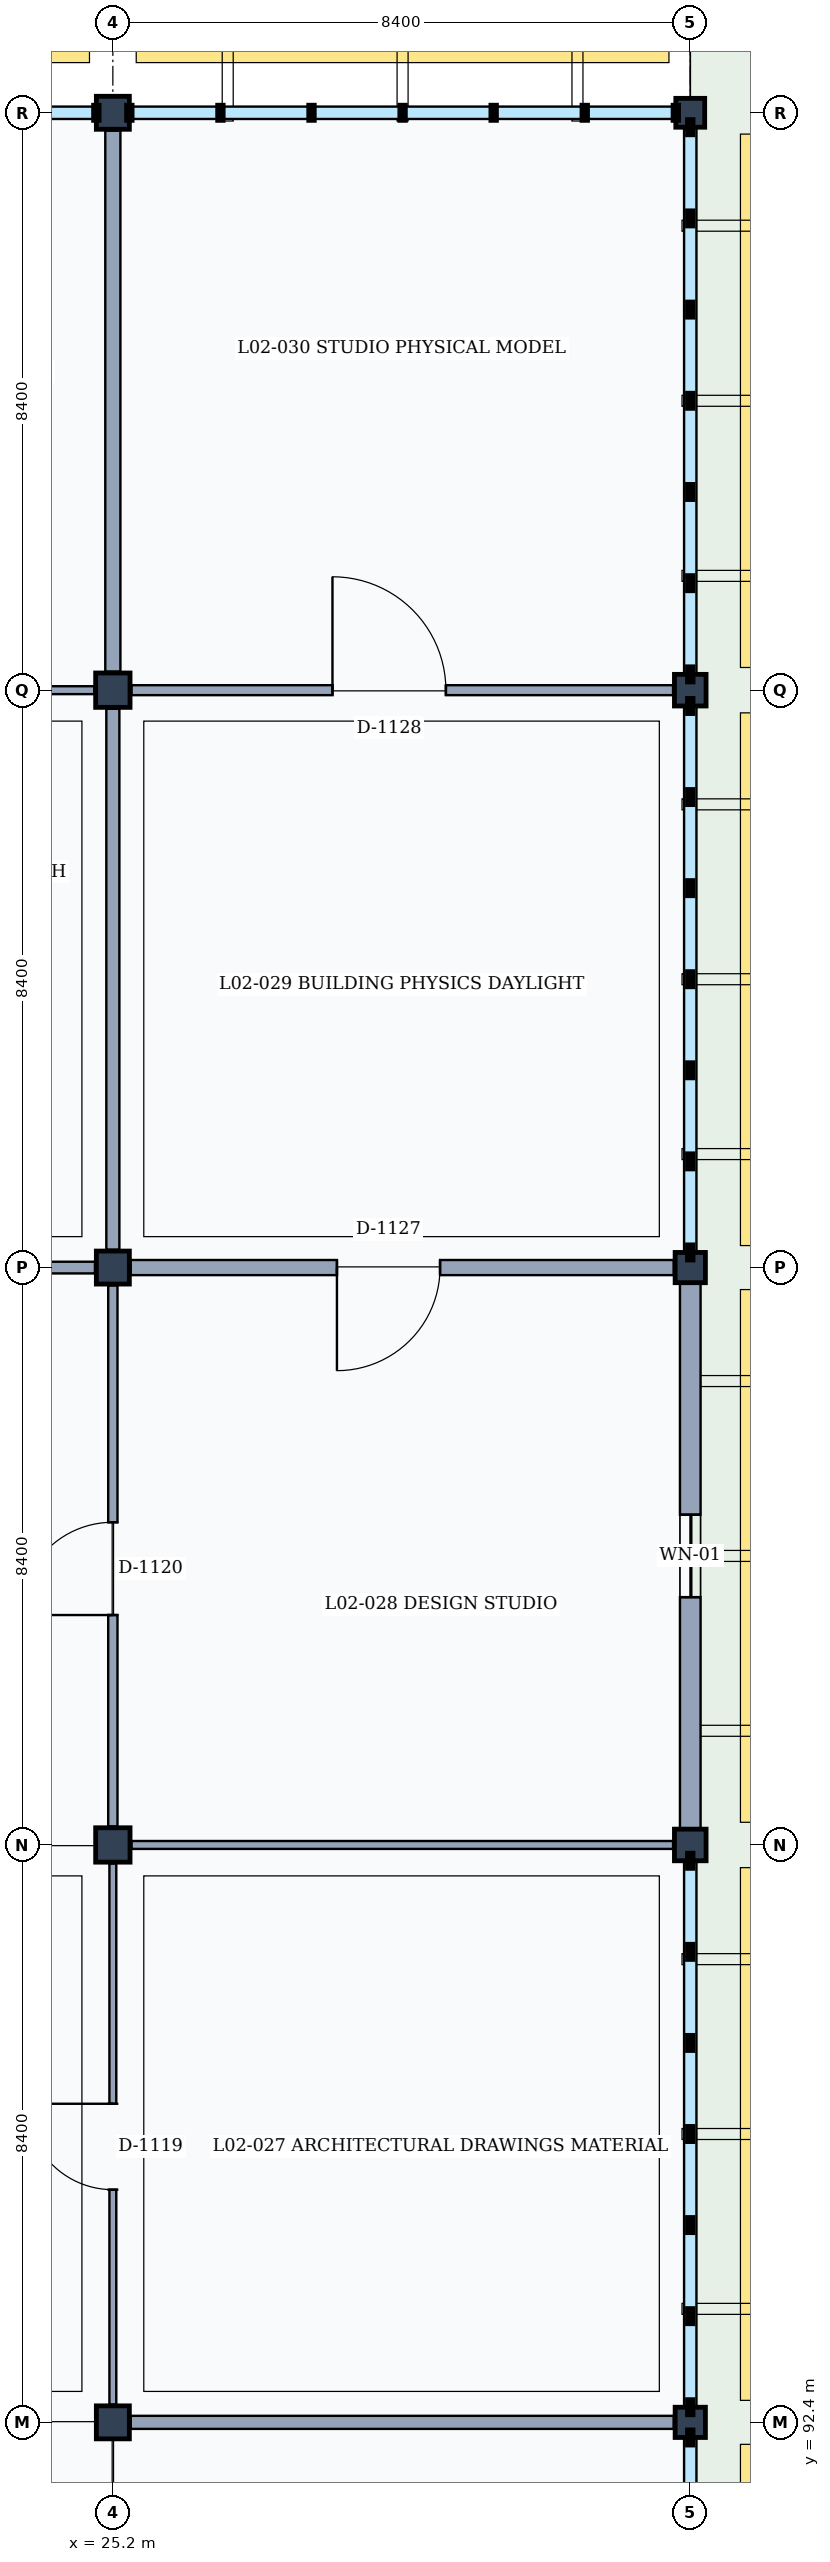
"""IFC4 building model, lengths in metres.
Left out: names, types, materials, properties, quantities, classifications, styles, units other than length and angle.
Written with IfcOpenShell. Run it as: python <this file> out.ifc"""

import sys

from ifc_helpers import new_model, si_unit, direction, frame, frame_2d, origin, origin_2d, place, context, subcontext, project, spatial, rectangle, extrude, element, fill, save


model = new_model("IFC4")
c1 = context("Model", 3, precision=1e-05, world=origin(), true_north=direction((0.0, 1.0)))
c2 = subcontext(c1, "Body", "Model", "MODEL_VIEW")
j1 = project(units=[si_unit("LENGTHUNIT", "METRE"), si_unit("PLANEANGLEUNIT", "RADIAN")], contexts=[c1])
p1 = place(None, origin())
s1 = spatial("IfcSite", under=j1, at=p1, CompositionType="ELEMENT")
p2 = place(p1, origin())
s2 = spatial("IfcBuilding", under=s1, at=p2, CompositionType="ELEMENT")
p3 = place(p2, frame((0.0, 0.0, 9.6)))
s3 = spatial("IfcBuildingStorey", under=s2, at=p3, CompositionType="ELEMENT", Elevation=9.6)
p4 = place(p3, frame((25.2, 92.4, 0.0), z_axis=(0.0, 0.0, 1.0), x_axis=(1.0, 0.0, 0.0)))
e1 = element("IfcColumn", 1, at=p4, inside=s3, PredefinedType="COLUMN", context=c2, shape_type="SweptSolid", body=[
    extrude(rectangle(XDim=0.48, YDim=0.48, at=origin_2d()), origin(), (0.0, 0.0, 1.0), 4.2),
])
p5 = place(p3, frame((25.2, 100.8, 0.0), z_axis=(0.0, 0.0, 1.0), x_axis=(1.0, 0.0, 0.0)))
e2 = element("IfcColumn", 2, at=p5, inside=s3, PredefinedType="COLUMN", context=c2, shape_type="SweptSolid", body=[
    extrude(rectangle(XDim=0.5, YDim=0.5, at=origin_2d()), origin(), (0.0, 0.0, 1.0), 4.2),
])
p6 = place(p3, frame((25.2, 109.2, 0.0), z_axis=(0.0, 0.0, 1.0), x_axis=(1.0, 0.0, 0.0)))
e3 = element("IfcColumn", 3, at=p6, inside=s3, PredefinedType="COLUMN", context=c2, shape_type="SweptSolid", body=[
    extrude(rectangle(XDim=0.48, YDim=0.48, at=origin_2d()), origin(), (0.0, 0.0, 1.0), 4.2),
])
p7 = place(p3, frame((25.2, 117.6, 0.0), z_axis=(0.0, 0.0, 1.0), x_axis=(1.0, 0.0, 0.0)))
e4 = element("IfcColumn", 4, at=p7, inside=s3, PredefinedType="COLUMN", context=c2, shape_type="SweptSolid", body=[
    extrude(rectangle(XDim=0.5, YDim=0.5, at=origin_2d()), origin(), (0.0, 0.0, 1.0), 4.2),
])
p8 = place(p3, frame((25.2, 126.0, 0.0), z_axis=(0.0, 0.0, 1.0), x_axis=(1.0, 0.0, 0.0)))
e5 = element("IfcColumn", 5, at=p8, inside=s3, PredefinedType="COLUMN", context=c2, shape_type="SweptSolid", body=[
    extrude(rectangle(XDim=0.48, YDim=0.48, at=origin_2d()), origin(), (0.0, 0.0, 1.0), 4.2),
])
p9 = place(p3, frame((33.6, 92.4, 0.0), z_axis=(0.0, 0.0, 1.0), x_axis=(1.0, 0.0, 0.0)))
e6 = element("IfcColumn", 6, at=p9, inside=s3, PredefinedType="COLUMN", context=c2, shape_type="SweptSolid", body=[
    extrude(rectangle(XDim=0.44, YDim=0.44, at=origin_2d()), origin(), (0.0, 0.0, 1.0), 4.2),
])
p10 = place(p3, frame((33.6, 100.8, 0.0), z_axis=(0.0, 0.0, 1.0), x_axis=(1.0, 0.0, 0.0)))
e7 = element("IfcColumn", 7, at=p10, inside=s3, PredefinedType="COLUMN", context=c2, shape_type="SweptSolid", body=[
    extrude(rectangle(XDim=0.46, YDim=0.46, at=origin_2d()), origin(), (0.0, 0.0, 1.0), 4.2),
])
p11 = place(p3, frame((33.6, 109.2, 0.0), z_axis=(0.0, 0.0, 1.0), x_axis=(1.0, 0.0, 0.0)))
e8 = element("IfcColumn", 8, at=p11, inside=s3, PredefinedType="COLUMN", context=c2, shape_type="SweptSolid", body=[
    extrude(rectangle(XDim=0.44, YDim=0.44, at=origin_2d()), origin(), (0.0, 0.0, 1.0), 4.2),
])
p12 = place(p3, frame((33.6, 117.6, 0.0), z_axis=(0.0, 0.0, 1.0), x_axis=(1.0, 0.0, 0.0)))
e9 = element("IfcColumn", 9, at=p12, inside=s3, PredefinedType="COLUMN", context=c2, shape_type="SweptSolid", body=[
    extrude(rectangle(XDim=0.46, YDim=0.46, at=origin_2d()), origin(), (0.0, 0.0, 1.0), 4.2),
])
p13 = place(p3, frame((33.6, 126.0, 0.0), z_axis=(0.0, 0.0, 1.0), x_axis=(1.0, 0.0, 0.0)))
e10 = element("IfcColumn", 10, at=p13, inside=s3, PredefinedType="COLUMN", context=c2, shape_type="SweptSolid", body=[
    extrude(rectangle(XDim=0.42, YDim=0.42, at=origin_2d()), origin(), (0.0, 0.0, 1.0), 4.2),
])
p14 = place(p3, frame((33.6, 108.98, 0.0), z_axis=(0.0, 0.0, 1.0), x_axis=(0.0, -1.0, 0.0)))
e11 = element("IfcWall", 11, at=p14, inside=s3, PredefinedType="SOLIDWALL", context=c2, shape_type="SweptSolid", body=[
    extrude(rectangle(XDim=7.95, YDim=0.3, at=frame_2d((3.975, 0.0))), origin(), (0.0, 0.0, 1.0), 3.36),
])
p15 = place(p14, frame((3.375, 0.0, 0.9)))
e12 = element("IfcOpeningElement", 12, at=p15, cuts=e11, PredefinedType="OPENING", context=c2, shape_type="SweptSolid", body=[
    extrude(rectangle(XDim=1.2, YDim=1.8, at=frame_2d((0.6, 0.9))), frame((0.0, 0.16, 0.0), z_axis=(0.0, -1.0, 0.0), x_axis=(1.0, 0.0, 0.0)), (0.0, 0.0, 1.0), 0.32),
])
p16 = place(p3, frame((25.2, 92.66, 0.0), z_axis=(0.0, 0.0, 1.0), x_axis=(0.0, 1.0, 0.0)))
e13 = element("IfcWall", 13, at=p16, inside=s3, PredefinedType="MOVABLE", context=c2, shape_type="SweptSolid", body=[
    extrude(rectangle(XDim=7.87, YDim=0.1, at=frame_2d((3.935, 0.0))), origin(), (0.0, 0.0, 1.0), 3.32),
])
p17 = place(p16, frame((3.125, 0.0, 0.0)))
e14 = element("IfcOpeningElement", 14, at=p17, cuts=e13, PredefinedType="OPENING", context=c2, shape_type="SweptSolid", body=[
    extrude(rectangle(XDim=1.25, YDim=2.3, at=frame_2d((0.625, 1.15))), frame((0.0, 0.06, 0.0), z_axis=(0.0, -1.0, 0.0), x_axis=(1.0, 0.0, 0.0)), (0.0, 0.0, 1.0), 0.12),
])
p18 = place(p3, frame((25.2, 101.07, 0.0), z_axis=(0.0, 0.0, 1.0), x_axis=(0.0, 1.0, 0.0)))
e15 = element("IfcWall", 15, at=p18, inside=s3, PredefinedType="PARTITIONING", context=c2, shape_type="SweptSolid", body=[
    extrude(rectangle(XDim=7.87, YDim=0.135, at=frame_2d((3.935, 0.0))), origin(), (0.0, 0.0, 1.0), 3.32),
])
p19 = place(p18, frame((3.075, 0.0, 0.0)))
e16 = element("IfcOpeningElement", 16, at=p19, cuts=e15, PredefinedType="OPENING", context=c2, shape_type="SweptSolid", body=[
    extrude(rectangle(XDim=1.35, YDim=2.25, at=frame_2d((0.675, 1.125))), frame((0.0, 0.077, 0.0), z_axis=(0.0, -1.0, 0.0), x_axis=(1.0, 0.0, 0.0)), (0.0, 0.0, 1.0), 0.155),
])
p20 = place(p3, frame((17.06, 109.2, 0.0), z_axis=(0.0, 0.0, 1.0), x_axis=(1.0, 0.0, 0.0)))
e17 = element("IfcWall", 17, at=p20, inside=s3, PredefinedType="PARTITIONING", context=c2, shape_type="SweptSolid", body=[
    extrude(rectangle(XDim=7.88, YDim=0.17, at=frame_2d((3.94, 0.0))), origin(), (0.0, 0.0, 1.0), 3.32),
])
p21 = place(p20, frame((3.025, 0.0, 0.0)))
e18 = element("IfcOpeningElement", 18, at=p21, cuts=e17, PredefinedType="OPENING", context=c2, shape_type="SweptSolid", body=[
    extrude(rectangle(XDim=1.45, YDim=2.35, at=frame_2d((0.725, 1.175))), frame((0.0, 0.095, 0.0), z_axis=(0.0, -1.0, 0.0), x_axis=(1.0, 0.0, 0.0)), (0.0, 0.0, 1.0), 0.19),
])
p22 = place(p3, frame((25.2, 109.46, 0.0), z_axis=(0.0, 0.0, 1.0), x_axis=(0.0, 1.0, 0.0)))
e19 = element("IfcWall", 19, at=p22, inside=s3, PredefinedType="PARTITIONING", context=c2, shape_type="SweptSolid", body=[
    extrude(rectangle(XDim=7.87, YDim=0.19, at=frame_2d((3.935, 0.0))), origin(), (0.0, 0.0, 1.0), 3.32),
])
p23 = place(p3, frame((17.07, 117.6, 0.0), z_axis=(0.0, 0.0, 1.0), x_axis=(1.0, 0.0, 0.0)))
e20 = element("IfcWall", 20, at=p23, inside=s3, PredefinedType="PARTITIONING", context=c2, shape_type="SweptSolid", body=[
    extrude(rectangle(XDim=7.86, YDim=0.115, at=frame_2d((3.93, 0.0))), origin(), (0.0, 0.0, 1.0), 3.32),
])
p24 = place(p23, frame((3.25, 0.0, 0.0)))
e21 = element("IfcOpeningElement", 21, at=p24, cuts=e20, PredefinedType="OPENING", context=c2, shape_type="SweptSolid", body=[
    extrude(rectangle(XDim=1.0, YDim=2.15, at=frame_2d((0.5, 1.075))), frame((0.0, 0.067, 0.0), z_axis=(0.0, -1.0, 0.0), x_axis=(1.0, 0.0, 0.0)), (0.0, 0.0, 1.0), 0.135),
])
p25 = place(p3, frame((25.2, 117.87, 0.0), z_axis=(0.0, 0.0, 1.0), x_axis=(0.0, 1.0, 0.0)))
e22 = element("IfcWall", 22, at=p25, inside=s3, PredefinedType="PARTITIONING", context=c2, shape_type="SweptSolid", body=[
    extrude(rectangle(XDim=7.87, YDim=0.22, at=frame_2d((3.935, 0.0))), origin(), (0.0, 0.0, 1.0), 3.32),
])
p26 = place(p3, frame((25.46, 92.4, 0.0), z_axis=(0.0, 0.0, 1.0), x_axis=(1.0, 0.0, 0.0)))
e23 = element("IfcWall", 23, at=p26, inside=s3, PredefinedType="PARTITIONING", context=c2, shape_type="SweptSolid", body=[
    extrude(rectangle(XDim=7.9, YDim=0.19, at=frame_2d((3.95, 0.0))), origin(), (0.0, 0.0, 1.0), 3.32),
])
p27 = place(p3, frame((25.47, 100.8, 0.0), z_axis=(0.0, 0.0, 1.0), x_axis=(1.0, 0.0, 0.0)))
e24 = element("IfcWall", 24, at=p27, inside=s3, PredefinedType="PARTITIONING", context=c2, shape_type="SweptSolid", body=[
    extrude(rectangle(XDim=7.88, YDim=0.115, at=frame_2d((3.94, 0.0))), origin(), (0.0, 0.0, 1.0), 3.32),
])
p28 = place(p3, frame((25.46, 109.2, 0.0), z_axis=(0.0, 0.0, 1.0), x_axis=(1.0, 0.0, 0.0)))
e25 = element("IfcWall", 25, at=p28, inside=s3, PredefinedType="PARTITIONING", context=c2, shape_type="SweptSolid", body=[
    extrude(rectangle(XDim=7.9, YDim=0.22, at=frame_2d((3.95, 0.0))), origin(), (0.0, 0.0, 1.0), 3.32),
])
p29 = place(p28, frame((3.0, 0.0, 0.0)))
e26 = element("IfcOpeningElement", 26, at=p29, cuts=e25, PredefinedType="OPENING", context=c2, shape_type="SweptSolid", body=[
    extrude(rectangle(XDim=1.5, YDim=2.3, at=frame_2d((0.75, 1.15))), frame((0.0, 0.12, 0.0), z_axis=(0.0, -1.0, 0.0), x_axis=(1.0, 0.0, 0.0)), (0.0, 0.0, 1.0), 0.24),
])
p30 = place(p3, frame((25.47, 117.6, 0.0), z_axis=(0.0, 0.0, 1.0), x_axis=(1.0, 0.0, 0.0)))
e27 = element("IfcWall", 27, at=p30, inside=s3, PredefinedType="PARTITIONING", context=c2, shape_type="SweptSolid", body=[
    extrude(rectangle(XDim=7.88, YDim=0.145, at=frame_2d((3.94, 0.0))), origin(), (0.0, 0.0, 1.0), 3.32),
])
p31 = place(p30, frame((2.925, 0.0, 0.0)))
e28 = element("IfcOpeningElement", 28, at=p31, cuts=e27, PredefinedType="OPENING", context=c2, shape_type="SweptSolid", body=[
    extrude(rectangle(XDim=1.65, YDim=2.25, at=frame_2d((0.825, 1.125))), frame((0.0, 0.083, 0.0), z_axis=(0.0, -1.0, 0.0), x_axis=(1.0, 0.0, 0.0)), (0.0, 0.0, 1.0), 0.165),
])
p32 = place(p15, origin())
e29 = element("IfcWindow", 29, at=p32, inside=s3, PartitioningType="SINGLE_PANEL", PredefinedType="WINDOW", context=c2, shape_type="SweptSolid", body=[
    extrude(rectangle(XDim=1.2, YDim=1.8, at=frame_2d((0.6, 0.9))), frame((0.0, 0.03, 0.0), z_axis=(0.0, -1.0, 0.0), x_axis=(1.0, 0.0, 0.0)), (0.0, 0.0, 1.0), 0.06),
])
fill(e12, e29)
p33 = place(p17, origin())
e30 = element("IfcDoor", 30, at=p33, inside=s3, OperationType="SINGLE_SWING_RIGHT", PredefinedType="DOOR", context=c2, shape_type="SweptSolid", body=[
    extrude(rectangle(XDim=1.25, YDim=2.3, at=frame_2d((0.625, 1.15))), frame((0.0, 0.025, 0.0), z_axis=(0.0, -1.0, 0.0), x_axis=(1.0, 0.0, 0.0)), (0.0, 0.0, 1.0), 0.05),
])
fill(e14, e30)
p34 = place(p19, origin())
e31 = element("IfcDoor", 31, at=p34, inside=s3, OperationType="SINGLE_SWING_LEFT", PredefinedType="DOOR", context=c2, shape_type="SweptSolid", body=[
    extrude(rectangle(XDim=1.35, YDim=2.25, at=frame_2d((0.675, 1.125))), frame((0.0, 0.025, 0.0), z_axis=(0.0, -1.0, 0.0), x_axis=(1.0, 0.0, 0.0)), (0.0, 0.0, 1.0), 0.05),
])
fill(e16, e31)
p35 = place(p29, frame((1.5, 0.0, 0.0), z_axis=(0.0, 0.0, 1.0), x_axis=(-1.0, 0.0, 0.0)))
e32 = element("IfcDoor", 32, at=p35, inside=s3, OperationType="SINGLE_SWING_RIGHT", PredefinedType="DOOR", context=c2, shape_type="SweptSolid", body=[
    extrude(rectangle(XDim=1.5, YDim=2.3, at=frame_2d((0.75, 1.15))), frame((0.0, 0.025, 0.0), z_axis=(0.0, -1.0, 0.0), x_axis=(1.0, 0.0, 0.0)), (0.0, 0.0, 1.0), 0.05),
])
fill(e26, e32)
p36 = place(p31, origin())
e33 = element("IfcDoor", 33, at=p36, inside=s3, OperationType="SINGLE_SWING_LEFT", PredefinedType="DOOR", context=c2, shape_type="SweptSolid", body=[
    extrude(rectangle(XDim=1.65, YDim=2.25, at=frame_2d((0.825, 1.125))), frame((0.0, 0.025, 0.0), z_axis=(0.0, -1.0, 0.0), x_axis=(1.0, 0.0, 0.0)), (0.0, 0.0, 1.0), 0.05),
])
fill(e28, e33)
save(model, sys.argv[1])
